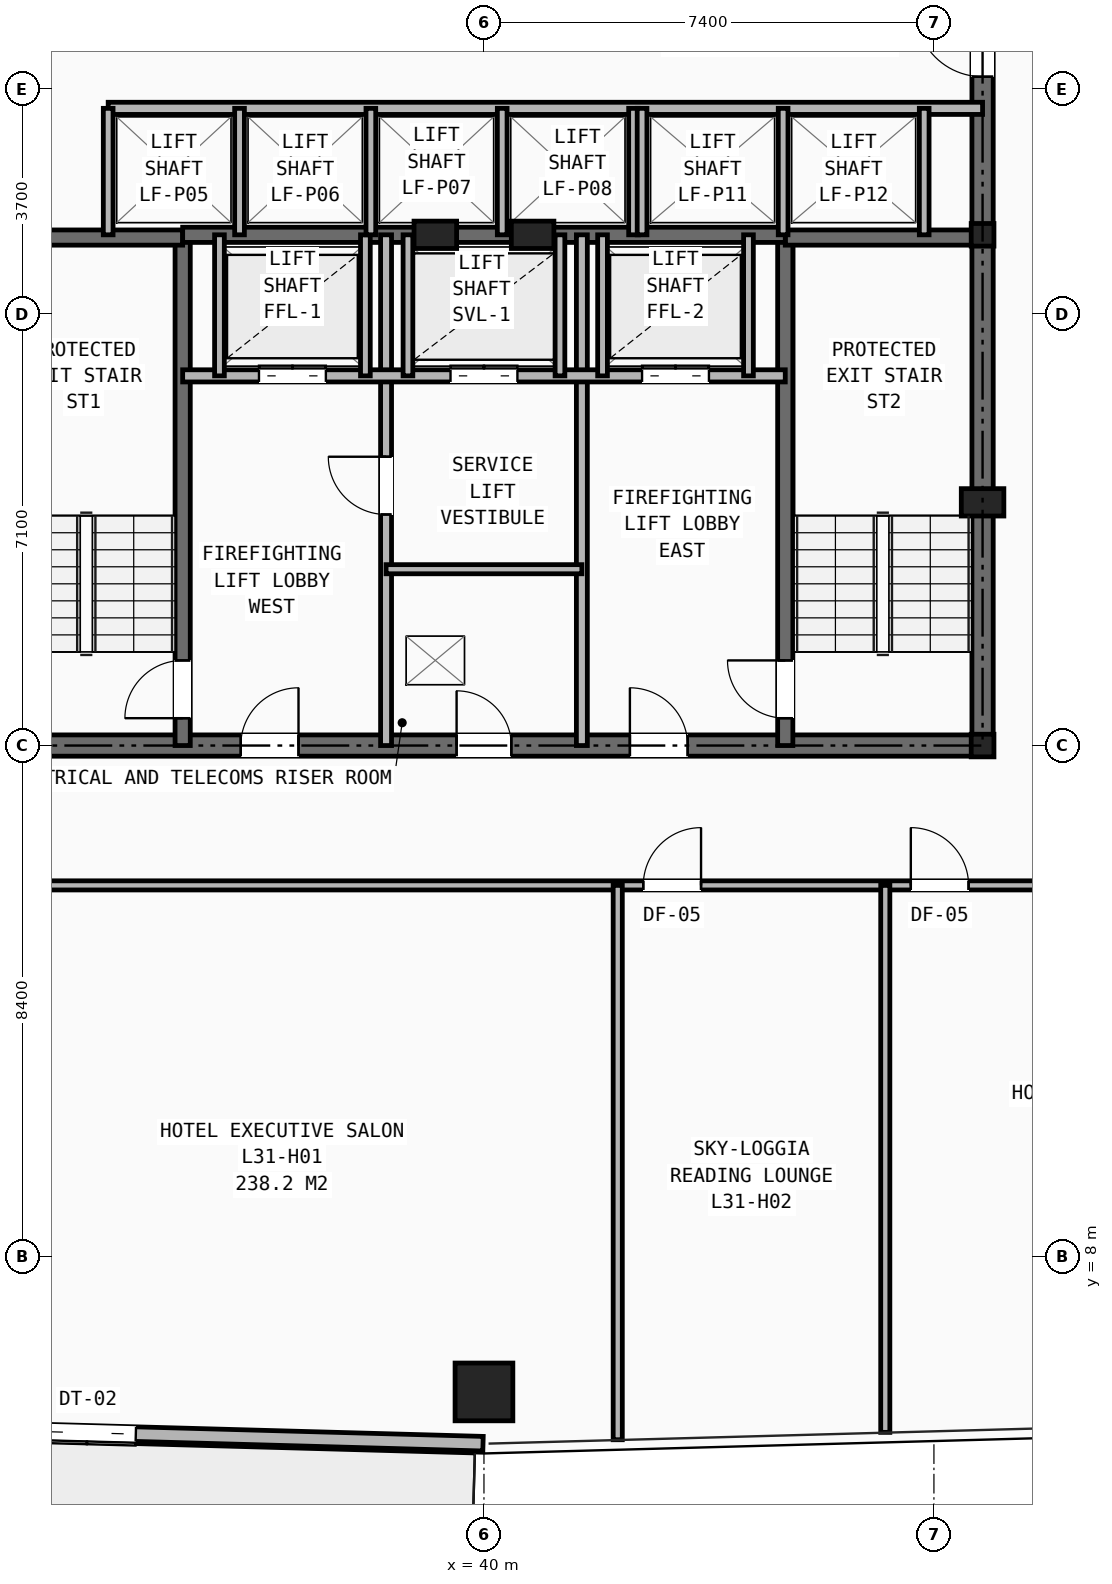
"""IFC4 building model, lengths in metres.
Left out: names, types, materials, properties, quantities, classifications, styles, units other than length and angle.
Written with IfcOpenShell. Run it as: python <this file> out.ifc"""

import sys

from ifc_helpers import new_model, si_unit, direction, frame, frame_2d, origin, origin_2d, place, context, subcontext, project, spatial, rectangle, hollow_rectangle, i_section, extrude, element, fill, save


model = new_model("IFC4")
c1 = context("Model", 3, precision=1e-05, world=origin(), true_north=direction((0.0, 1.0)))
c2 = subcontext(c1, "Body", "Model", "MODEL_VIEW")
j1 = project(units=[si_unit("LENGTHUNIT", "METRE"), si_unit("PLANEANGLEUNIT", "RADIAN")], contexts=[c1])
p1 = place(None, origin())
s1 = spatial("IfcSite", under=j1, at=p1, CompositionType="ELEMENT")
p2 = place(p1, origin())
s2 = spatial("IfcBuilding", under=s1, at=p2, CompositionType="ELEMENT")
p3 = place(p2, frame((0.0, 0.0, 108.6)))
s3 = spatial("IfcBuildingStorey", under=s2, at=p3, CompositionType="ELEMENT", Elevation=108.6)
for number, where, z_axis, x_axis in (
    (1, (48.2, 16.4, 0.0), (0.0, 0.0, 1.0), (1.0, 0.0, 0.0)),
    (2, (48.2, 24.8, 0.0), (0.0, 0.0, 1.0), (1.0, 0.0, 0.0)),
):
    element("IfcColumn", number, at=place(p3, frame(where, z_axis=z_axis, x_axis=x_axis)), inside=s3, PredefinedType="COLUMN", context=c2, shape_type="SweptSolid", body=[
        extrude(i_section(OverallWidth=0.374, OverallDepth=0.372, WebThickness=0.016, FlangeThickness=0.026, at=origin_2d()), origin(), (0.0, 0.0, 1.0), 3.2),
    ])
for number, where, z_axis, x_axis in (
    (3, (48.2, 20.4, 0.0), (0.0, 0.0, 1.0), (1.0, 0.0, 0.0)),
    (4, (39.2, 24.8, 0.0), (0.0, 0.0, 1.0), (1.0, 0.0, 0.0)),
    (5, (40.8, 24.8, 0.0), (0.0, 0.0, 1.0), (1.0, 0.0, 0.0)),
):
    element("IfcColumn", number, at=place(p3, frame(where, z_axis=z_axis, x_axis=x_axis)), inside=s3, PredefinedType="PILASTER", context=c2, shape_type="SweptSolid", body=[
        extrude(rectangle(XDim=0.7, YDim=0.45, at=origin_2d()), origin(), (0.0, 0.0, 1.0), 3.2),
    ])
p4 = place(p3, frame((40.0, 5.769, 0.0), z_axis=(0.0, 0.0, 1.0), x_axis=(1.0, 0.0, 0.0)))
e6 = element("IfcColumn", 6, at=p4, inside=s3, PredefinedType="COLUMN", context=c2, shape_type="SweptSolid", body=[
    extrude(hollow_rectangle(XDim=0.95, YDim=0.95, WallThickness=0.065, at=origin_2d()), origin(), (0.0, 0.0, 1.0), 3.2),
])
p5 = place(p3, frame((39.984, 4.917, 0.0), z_axis=(0.0, 0.0, 1.0), x_axis=(-0.99962044601, 0.027549299805, 0.0)))
e7 = element("IfcWall", 7, at=p5, inside=s3, PredefinedType="SHEAR", context=c2, shape_type="SweptSolid", body=[
    extrude(rectangle(XDim=23.183, YDim=0.24, at=frame_2d((11.591, 0.0))), origin(), (0.0, 0.0, 1.0), 2.223),
])
p6 = place(p5, frame((5.712, 0.0, 0.0)))
e8 = element("IfcOpeningElement", 8, at=p6, cuts=e7, PredefinedType="OPENING", context=c2, shape_type="SweptSolid", body=[
    extrude(rectangle(XDim=1.6, YDim=2.04, at=frame_2d((0.8, 1.02))), frame((0.0, 0.13, 0.0), z_axis=(0.0, -1.0, 0.0), x_axis=(1.0, 0.0, 0.0)), (0.0, 0.0, 1.0), 0.26),
])
p7 = place(p5, frame((16.062, 0.0, 0.25)))
e9 = element("IfcOpeningElement", 9, at=p7, cuts=e7, PredefinedType="OPENING", context=c2, shape_type="SweptSolid", body=[
    extrude(rectangle(XDim=2.1, YDim=1.7, at=frame_2d((1.05, 0.85))), frame((0.0, 0.13, 0.0), z_axis=(0.0, -1.0, 0.0), x_axis=(1.0, 0.0, 0.0)), (0.0, 0.0, 1.0), 0.26),
])
p8 = place(p3, frame((31.8, 16.4, 0.0), z_axis=(0.0, 0.0, 1.0), x_axis=(1.0, 0.0, 0.0)))
e10 = element("IfcWall", 10, at=p8, inside=s3, PredefinedType="SHEAR", context=c2, shape_type="SweptSolid", body=[
    extrude(rectangle(XDim=16.4, YDim=0.35, at=frame_2d((8.2, 0.0))), origin(), (0.0, 0.0, 1.0), 2.94),
])
p9 = place(p8, frame((7.75, 0.0, 0.0)))
e11 = element("IfcOpeningElement", 11, at=p9, cuts=e10, PredefinedType="OPENING", context=c2, shape_type="SweptSolid", body=[
    extrude(rectangle(XDim=0.9, YDim=2.1, at=frame_2d((0.45, 1.05))), frame((0.0, 0.185, 0.0), z_axis=(0.0, -1.0, 0.0), x_axis=(1.0, 0.0, 0.0)), (0.0, 0.0, 1.0), 0.37),
])
p10 = place(p8, frame((4.2, 0.0, 0.0)))
e12 = element("IfcOpeningElement", 12, at=p10, cuts=e10, PredefinedType="OPENING", context=c2, shape_type="SweptSolid", body=[
    extrude(rectangle(XDim=0.95, YDim=2.1, at=frame_2d((0.475, 1.05))), frame((0.0, 0.185, 0.0), z_axis=(0.0, -1.0, 0.0), x_axis=(1.0, 0.0, 0.0)), (0.0, 0.0, 1.0), 0.37),
])
p11 = place(p8, frame((10.6, 0.0, 0.0)))
e13 = element("IfcOpeningElement", 13, at=p11, cuts=e10, PredefinedType="OPENING", context=c2, shape_type="SweptSolid", body=[
    extrude(rectangle(XDim=0.95, YDim=2.1, at=frame_2d((0.475, 1.05))), frame((0.0, 0.185, 0.0), z_axis=(0.0, -1.0, 0.0), x_axis=(1.0, 0.0, 0.0)), (0.0, 0.0, 1.0), 0.37),
])
p12 = place(p3, frame((48.2, 16.4, 0.0), z_axis=(0.0, 0.0, 1.0), x_axis=(0.0, 1.0, 0.0)))
e14 = element("IfcWall", 14, at=p12, inside=s3, PredefinedType="SHEAR", context=c2, shape_type="SweptSolid", body=[
    extrude(rectangle(XDim=14.8, YDim=0.35, at=frame_2d((7.4, 0.0))), origin(), (0.0, 0.0, 1.0), 2.94),
])
p13 = place(p12, frame((11.0, 0.0, 0.0)))
e15 = element("IfcOpeningElement", 15, at=p13, cuts=e14, PredefinedType="OPENING", context=c2, shape_type="SweptSolid", body=[
    extrude(rectangle(XDim=1.1, YDim=2.15, at=frame_2d((0.55, 1.075))), frame((0.0, 0.185, 0.0), z_axis=(0.0, -1.0, 0.0), x_axis=(1.0, 0.0, 0.0)), (0.0, 0.0, 1.0), 0.37),
])
p14 = place(p3, frame((35.045, 16.4, 0.0), z_axis=(0.0, 0.0, 1.0), x_axis=(0.0, 1.0, 0.0)))
e16 = element("IfcWall", 16, at=p14, inside=s3, PredefinedType="SHEAR", context=c2, shape_type="SweptSolid", body=[
    extrude(rectangle(XDim=8.4, YDim=0.25, at=frame_2d((4.2, 0.0))), origin(), (0.0, 0.0, 1.0), 2.94),
])
p15 = place(p14, frame((0.45, 0.0, 0.0)))
e17 = element("IfcOpeningElement", 17, at=p15, cuts=e16, PredefinedType="OPENING", context=c2, shape_type="SweptSolid", body=[
    extrude(rectangle(XDim=0.95, YDim=2.1, at=frame_2d((0.475, 1.05))), frame((0.0, 0.135, 0.0), z_axis=(0.0, -1.0, 0.0), x_axis=(1.0, 0.0, 0.0)), (0.0, 0.0, 1.0), 0.27),
])
p16 = place(p3, frame((31.8, 24.755, 0.0), z_axis=(0.0, 0.0, 1.0), x_axis=(1.0, 0.0, 0.0)))
e18 = element("IfcWall", 18, at=p16, inside=s3, PredefinedType="SHEAR", context=c2, shape_type="SweptSolid", body=[
    extrude(rectangle(XDim=3.245, YDim=0.25, at=frame_2d((1.623, 0.0))), origin(), (0.0, 0.0, 1.0), 2.94),
])
p17 = place(p3, frame((44.955, 16.4, 0.0), z_axis=(0.0, 0.0, 1.0), x_axis=(0.0, 1.0, 0.0)))
e19 = element("IfcWall", 19, at=p17, inside=s3, PredefinedType="SHEAR", context=c2, shape_type="SweptSolid", body=[
    extrude(rectangle(XDim=8.4, YDim=0.25, at=frame_2d((4.2, 0.0))), origin(), (0.0, 0.0, 1.0), 2.94),
])
p18 = place(p17, frame((0.45, 0.0, 0.0)))
e20 = element("IfcOpeningElement", 20, at=p18, cuts=e19, PredefinedType="OPENING", context=c2, shape_type="SweptSolid", body=[
    extrude(rectangle(XDim=0.95, YDim=2.1, at=frame_2d((0.475, 1.05))), frame((0.0, 0.135, 0.0), z_axis=(0.0, -1.0, 0.0), x_axis=(1.0, 0.0, 0.0)), (0.0, 0.0, 1.0), 0.27),
])
p19 = place(p3, frame((44.955, 24.755, 0.0), z_axis=(0.0, 0.0, 1.0), x_axis=(1.0, 0.0, 0.0)))
e21 = element("IfcWall", 21, at=p19, inside=s3, PredefinedType="SHEAR", context=c2, shape_type="SweptSolid", body=[
    extrude(rectangle(XDim=3.245, YDim=0.25, at=frame_2d((1.623, 0.0))), origin(), (0.0, 0.0, 1.0), 2.94),
])
p20 = place(p3, frame((35.045, 24.8, 0.0), z_axis=(0.0, 0.0, 1.0), x_axis=(1.0, 0.0, 0.0)))
e22 = element("IfcWall", 22, at=p20, inside=s3, PredefinedType="SHEAR", context=c2, shape_type="SweptSolid", body=[
    extrude(rectangle(XDim=9.91, YDim=0.25, at=frame_2d((4.955, 0.0))), origin(), (0.0, 0.0, 1.0), 2.94),
])
p21 = place(p3, frame((38.39, 16.4, 0.0), z_axis=(0.0, 0.0, 1.0), x_axis=(0.0, 1.0, 0.0)))
e23 = element("IfcWall", 23, at=p21, inside=s3, PredefinedType="PARTITIONING", context=c2, shape_type="SweptSolid", body=[
    extrude(rectangle(XDim=8.4, YDim=0.18, at=frame_2d((4.2, 0.0))), origin(), (0.0, 0.0, 1.0), 2.391),
])
p22 = place(p21, frame((3.8, 0.0, 0.0)))
e24 = element("IfcOpeningElement", 24, at=p22, cuts=e23, PredefinedType="OPENING", context=c2, shape_type="SweptSolid", body=[
    extrude(rectangle(XDim=0.95, YDim=2.1, at=frame_2d((0.475, 1.05))), frame((0.0, 0.1, 0.0), z_axis=(0.0, -1.0, 0.0), x_axis=(1.0, 0.0, 0.0)), (0.0, 0.0, 1.0), 0.2),
])
p23 = place(p3, frame((41.61, 16.4, 0.0), z_axis=(0.0, 0.0, 1.0), x_axis=(0.0, 1.0, 0.0)))
e25 = element("IfcWall", 25, at=p23, inside=s3, PredefinedType="PARTITIONING", context=c2, shape_type="SweptSolid", body=[
    extrude(rectangle(XDim=8.4, YDim=0.18, at=frame_2d((4.2, 0.0))), origin(), (0.0, 0.0, 1.0), 2.391),
])
p24 = place(p3, frame((35.045, 22.48, 0.0), z_axis=(0.0, 0.0, 1.0), x_axis=(1.0, 0.0, 0.0)))
e26 = element("IfcWall", 26, at=p24, inside=s3, PredefinedType="SOLIDWALL", context=c2, shape_type="SweptSolid", body=[
    extrude(rectangle(XDim=9.91, YDim=0.2, at=frame_2d((4.955, 0.0))), origin(), (0.0, 0.0, 1.0), 2.94),
])
p25 = place(p24, frame((1.255, 0.0, 0.0)))
e27 = element("IfcOpeningElement", 27, at=p25, cuts=e26, PredefinedType="OPENING", context=c2, shape_type="SweptSolid", body=[
    extrude(rectangle(XDim=1.1, YDim=2.15, at=frame_2d((0.55, 1.075))), frame((0.0, 0.11, 0.0), z_axis=(0.0, -1.0, 0.0), x_axis=(1.0, 0.0, 0.0)), (0.0, 0.0, 1.0), 0.22),
])
p26 = place(p24, frame((7.555, 0.0, 0.0)))
e28 = element("IfcOpeningElement", 28, at=p26, cuts=e26, PredefinedType="OPENING", context=c2, shape_type="SweptSolid", body=[
    extrude(rectangle(XDim=1.1, YDim=2.15, at=frame_2d((0.55, 1.075))), frame((0.0, 0.11, 0.0), z_axis=(0.0, -1.0, 0.0), x_axis=(1.0, 0.0, 0.0)), (0.0, 0.0, 1.0), 0.22),
])
p27 = place(p24, frame((4.405, 0.0, 0.0)))
e29 = element("IfcOpeningElement", 29, at=p27, cuts=e26, PredefinedType="OPENING", context=c2, shape_type="SweptSolid", body=[
    extrude(rectangle(XDim=1.1, YDim=2.15, at=frame_2d((0.55, 1.075))), frame((0.0, 0.11, 0.0), z_axis=(0.0, -1.0, 0.0), x_axis=(1.0, 0.0, 0.0)), (0.0, 0.0, 1.0), 0.22),
])
p28 = place(p3, frame((38.39, 19.3, 0.0), z_axis=(0.0, 0.0, 1.0), x_axis=(1.0, 0.0, 0.0)))
e30 = element("IfcWall", 30, at=p28, inside=s3, PredefinedType="PARTITIONING", context=c2, shape_type="SweptSolid", body=[
    extrude(rectangle(XDim=3.22, YDim=0.15, at=frame_2d((1.61, 0.0))), origin(), (0.0, 0.0, 1.0), 2.94),
])
for number, where, z_axis, x_axis in (
    (31, (35.65, 22.48, 0.0), (0.0, 0.0, 1.0), (0.0, 1.0, 0.0)),
    (32, (38.05, 22.48, 0.0), (0.0, 0.0, 1.0), (0.0, 1.0, 0.0)),
    (33, (41.95, 22.48, 0.0), (0.0, 0.0, 1.0), (0.0, 1.0, 0.0)),
    (34, (44.35, 22.48, 0.0), (0.0, 0.0, 1.0), (0.0, 1.0, 0.0)),
    (35, (38.75, 22.48, 0.0), (0.0, 0.0, 1.0), (0.0, 1.0, 0.0)),
    (36, (41.25, 22.48, 0.0), (0.0, 0.0, 1.0), (0.0, 1.0, 0.0)),
):
    element("IfcWall", number, at=place(p3, frame(where, z_axis=z_axis, x_axis=x_axis)), inside=s3, PredefinedType="SOLIDWALL", context=c2, shape_type="SweptSolid", body=[
        extrude(rectangle(XDim=2.32, YDim=0.16, at=frame_2d((1.16, 0.0))), origin(), (0.0, 0.0, 1.0), 2.94),
    ])
p29 = place(p3, frame((33.82, 26.88, 0.0), z_axis=(0.0, 0.0, 1.0), x_axis=(1.0, 0.0, 0.0)))
e37 = element("IfcWall", 37, at=p29, inside=s3, PredefinedType="SOLIDWALL", context=c2, shape_type="SweptSolid", body=[
    extrude(rectangle(XDim=14.38, YDim=0.2, at=frame_2d((7.19, 0.0))), origin(), (0.0, 0.0, 1.0), 2.391),
])
for number, where, z_axis, x_axis in (
    (38, (33.82, 24.8, 0.0), (0.0, 0.0, 1.0), (0.0, 1.0, 0.0)),
    (39, (35.98, 24.8, 0.0), (0.0, 0.0, 1.0), (0.0, 1.0, 0.0)),
    (40, (38.14, 24.8, 0.0), (0.0, 0.0, 1.0), (0.0, 1.0, 0.0)),
    (41, (40.3, 24.8, 0.0), (0.0, 0.0, 1.0), (0.0, 1.0, 0.0)),
    (42, (42.46, 24.8, 0.0), (0.0, 0.0, 1.0), (0.0, 1.0, 0.0)),
    (43, (42.6, 24.8, 0.0), (0.0, 0.0, 1.0), (0.0, 1.0, 0.0)),
    (44, (44.92, 24.8, 0.0), (0.0, 0.0, 1.0), (0.0, 1.0, 0.0)),
    (45, (47.24, 24.8, 0.0), (0.0, 0.0, 1.0), (0.0, 1.0, 0.0)),
):
    element("IfcWall", number, at=place(p3, frame(where, z_axis=z_axis, x_axis=x_axis)), inside=s3, PredefinedType="SOLIDWALL", context=c2, shape_type="SweptSolid", body=[
        extrude(rectangle(XDim=2.08, YDim=0.16, at=frame_2d((1.04, 0.0))), origin(), (0.0, 0.0, 1.0), 2.94),
    ])
p30 = place(p3, frame((29.6, 14.1, 0.0), z_axis=(0.0, 0.0, 1.0), x_axis=(1.0, 0.0, 0.0)))
e46 = element("IfcWall", 46, at=p30, inside=s3, PredefinedType="PARTITIONING", context=c2, shape_type="SweptSolid", body=[
    extrude(rectangle(XDim=20.8, YDim=0.15, at=frame_2d((10.4, 0.0))), origin(), (0.0, 0.0, 1.0), 2.151),
])
p31 = place(p30, frame((0.57, 0.0, 0.0)))
e47 = element("IfcOpeningElement", 47, at=p31, cuts=e46, PredefinedType="OPENING", context=c2, shape_type="SweptSolid", body=[
    extrude(rectangle(XDim=0.95, YDim=2.1, at=frame_2d((0.475, 1.05))), frame((0.0, 0.085, 0.0), z_axis=(0.0, -1.0, 0.0), x_axis=(1.0, 0.0, 0.0)), (0.0, 0.0, 1.0), 0.17),
])
p32 = place(p30, frame((13.02, 0.0, 0.0)))
e48 = element("IfcOpeningElement", 48, at=p32, cuts=e46, PredefinedType="OPENING", context=c2, shape_type="SweptSolid", body=[
    extrude(rectangle(XDim=0.95, YDim=2.1, at=frame_2d((0.475, 1.05))), frame((0.0, 0.085, 0.0), z_axis=(0.0, -1.0, 0.0), x_axis=(1.0, 0.0, 0.0)), (0.0, 0.0, 1.0), 0.17),
])
p33 = place(p30, frame((17.42, 0.0, 0.0)))
e49 = element("IfcOpeningElement", 49, at=p33, cuts=e46, PredefinedType="OPENING", context=c2, shape_type="SweptSolid", body=[
    extrude(rectangle(XDim=0.95, YDim=2.1, at=frame_2d((0.475, 1.05))), frame((0.0, 0.085, 0.0), z_axis=(0.0, -1.0, 0.0), x_axis=(1.0, 0.0, 0.0)), (0.0, 0.0, 1.0), 0.17),
])
p34 = place(p3, frame((42.2, 4.983, 0.0), z_axis=(0.0, 0.0, 1.0), x_axis=(0.0, 1.0, 0.0)))
e50 = element("IfcWall", 50, at=p34, inside=s3, PredefinedType="PARTITIONING", context=c2, shape_type="SweptSolid", body=[
    extrude(rectangle(XDim=9.117, YDim=0.15, at=frame_2d((4.559, 0.0))), origin(), (0.0, 0.0, 1.0), 2.228),
])
p35 = place(p3, frame((46.6, 5.104, 0.0), z_axis=(0.0, 0.0, 1.0), x_axis=(0.0, 1.0, 0.0)))
e51 = element("IfcWall", 51, at=p35, inside=s3, PredefinedType="PARTITIONING", context=c2, shape_type="SweptSolid", body=[
    extrude(rectangle(XDim=8.996, YDim=0.15, at=frame_2d((4.498, 0.0))), origin(), (0.0, 0.0, 1.0), 2.228),
])
p36 = place(p6, origin())
e52 = element("IfcDoor", 52, at=p36, inside=s3, OperationType="SINGLE_SWING_LEFT", PredefinedType="DOOR", context=c2, shape_type="SweptSolid", body=[
    extrude(rectangle(XDim=1.6, YDim=2.04, at=frame_2d((0.8, 1.02))), frame((0.0, 0.025, 0.0), z_axis=(0.0, -1.0, 0.0), x_axis=(1.0, 0.0, 0.0)), (0.0, 0.0, 1.0), 0.05),
])
fill(e8, e52)
p37 = place(p9, origin())
e53 = element("IfcDoor", 53, at=p37, inside=s3, OperationType="SINGLE_SWING_LEFT", PredefinedType="DOOR", context=c2, shape_type="SweptSolid", body=[
    extrude(rectangle(XDim=0.9, YDim=2.1, at=frame_2d((0.45, 1.05))), frame((0.0, 0.025, 0.0), z_axis=(0.0, -1.0, 0.0), x_axis=(1.0, 0.0, 0.0)), (0.0, 0.0, 1.0), 0.05),
])
fill(e11, e53)
p38 = place(p22, origin())
e54 = element("IfcDoor", 54, at=p38, inside=s3, OperationType="SINGLE_SWING_RIGHT", PredefinedType="DOOR", context=c2, shape_type="SweptSolid", body=[
    extrude(rectangle(XDim=0.95, YDim=2.1, at=frame_2d((0.475, 1.05))), frame((0.0, 0.025, 0.0), z_axis=(0.0, -1.0, 0.0), x_axis=(1.0, 0.0, 0.0)), (0.0, 0.0, 1.0), 0.05),
])
fill(e24, e54)
p39 = place(p15, origin())
e55 = element("IfcDoor", 55, at=p39, inside=s3, OperationType="SINGLE_SWING_LEFT", PredefinedType="DOOR", context=c2, shape_type="SweptSolid", body=[
    extrude(rectangle(XDim=0.95, YDim=2.1, at=frame_2d((0.475, 1.05))), frame((0.0, 0.025, 0.0), z_axis=(0.0, -1.0, 0.0), x_axis=(1.0, 0.0, 0.0)), (0.0, 0.0, 1.0), 0.05),
])
fill(e17, e55)
p40 = place(p18, origin())
e56 = element("IfcDoor", 56, at=p40, inside=s3, OperationType="SINGLE_SWING_RIGHT", PredefinedType="DOOR", context=c2, shape_type="SweptSolid", body=[
    extrude(rectangle(XDim=0.95, YDim=2.1, at=frame_2d((0.475, 1.05))), frame((0.0, 0.025, 0.0), z_axis=(0.0, -1.0, 0.0), x_axis=(1.0, 0.0, 0.0)), (0.0, 0.0, 1.0), 0.05),
])
fill(e20, e56)
p41 = place(p10, origin())
e57 = element("IfcDoor", 57, at=p41, inside=s3, OperationType="SINGLE_SWING_RIGHT", PredefinedType="DOOR", context=c2, shape_type="SweptSolid", body=[
    extrude(rectangle(XDim=0.95, YDim=2.1, at=frame_2d((0.475, 1.05))), frame((0.0, 0.025, 0.0), z_axis=(0.0, -1.0, 0.0), x_axis=(1.0, 0.0, 0.0)), (0.0, 0.0, 1.0), 0.05),
])
fill(e12, e57)
p42 = place(p11, origin())
e58 = element("IfcDoor", 58, at=p42, inside=s3, OperationType="SINGLE_SWING_LEFT", PredefinedType="DOOR", context=c2, shape_type="SweptSolid", body=[
    extrude(rectangle(XDim=0.95, YDim=2.1, at=frame_2d((0.475, 1.05))), frame((0.0, 0.025, 0.0), z_axis=(0.0, -1.0, 0.0), x_axis=(1.0, 0.0, 0.0)), (0.0, 0.0, 1.0), 0.05),
])
fill(e13, e58)
p43 = place(p25, origin())
e59 = element("IfcDoor", 59, at=p43, inside=s3, OperationType="DOUBLE_DOOR_SLIDING", PredefinedType="DOOR", context=c2, shape_type="SweptSolid", body=[
    extrude(rectangle(XDim=1.1, YDim=2.15, at=frame_2d((0.55, 1.075))), frame((0.0, 0.025, 0.0), z_axis=(0.0, -1.0, 0.0), x_axis=(1.0, 0.0, 0.0)), (0.0, 0.0, 1.0), 0.05),
])
fill(e27, e59)
p44 = place(p26, origin())
e60 = element("IfcDoor", 60, at=p44, inside=s3, OperationType="DOUBLE_DOOR_SLIDING", PredefinedType="DOOR", context=c2, shape_type="SweptSolid", body=[
    extrude(rectangle(XDim=1.1, YDim=2.15, at=frame_2d((0.55, 1.075))), frame((0.0, 0.025, 0.0), z_axis=(0.0, -1.0, 0.0), x_axis=(1.0, 0.0, 0.0)), (0.0, 0.0, 1.0), 0.05),
])
fill(e28, e60)
p45 = place(p27, origin())
e61 = element("IfcDoor", 61, at=p45, inside=s3, OperationType="DOUBLE_DOOR_SLIDING", PredefinedType="DOOR", context=c2, shape_type="SweptSolid", body=[
    extrude(rectangle(XDim=1.1, YDim=2.15, at=frame_2d((0.55, 1.075))), frame((0.0, 0.025, 0.0), z_axis=(0.0, -1.0, 0.0), x_axis=(1.0, 0.0, 0.0)), (0.0, 0.0, 1.0), 0.05),
])
fill(e29, e61)
p46 = place(p13, origin())
e62 = element("IfcDoor", 62, at=p46, inside=s3, OperationType="SINGLE_SWING_RIGHT", PredefinedType="DOOR", context=c2, shape_type="SweptSolid", body=[
    extrude(rectangle(XDim=1.1, YDim=2.15, at=frame_2d((0.55, 1.075))), frame((0.0, 0.025, 0.0), z_axis=(0.0, -1.0, 0.0), x_axis=(1.0, 0.0, 0.0)), (0.0, 0.0, 1.0), 0.05),
])
fill(e15, e62)
p47 = place(p32, origin())
e63 = element("IfcDoor", 63, at=p47, inside=s3, OperationType="SINGLE_SWING_RIGHT", PredefinedType="DOOR", context=c2, shape_type="SweptSolid", body=[
    extrude(rectangle(XDim=0.95, YDim=2.1, at=frame_2d((0.475, 1.05))), frame((0.0, 0.025, 0.0), z_axis=(0.0, -1.0, 0.0), x_axis=(1.0, 0.0, 0.0)), (0.0, 0.0, 1.0), 0.05),
])
fill(e48, e63)
p48 = place(p33, origin())
e64 = element("IfcDoor", 64, at=p48, inside=s3, OperationType="SINGLE_SWING_LEFT", PredefinedType="DOOR", context=c2, shape_type="SweptSolid", body=[
    extrude(rectangle(XDim=0.95, YDim=2.1, at=frame_2d((0.475, 1.05))), frame((0.0, 0.025, 0.0), z_axis=(0.0, -1.0, 0.0), x_axis=(1.0, 0.0, 0.0)), (0.0, 0.0, 1.0), 0.05),
])
fill(e49, e64)
save(model, sys.argv[1])
